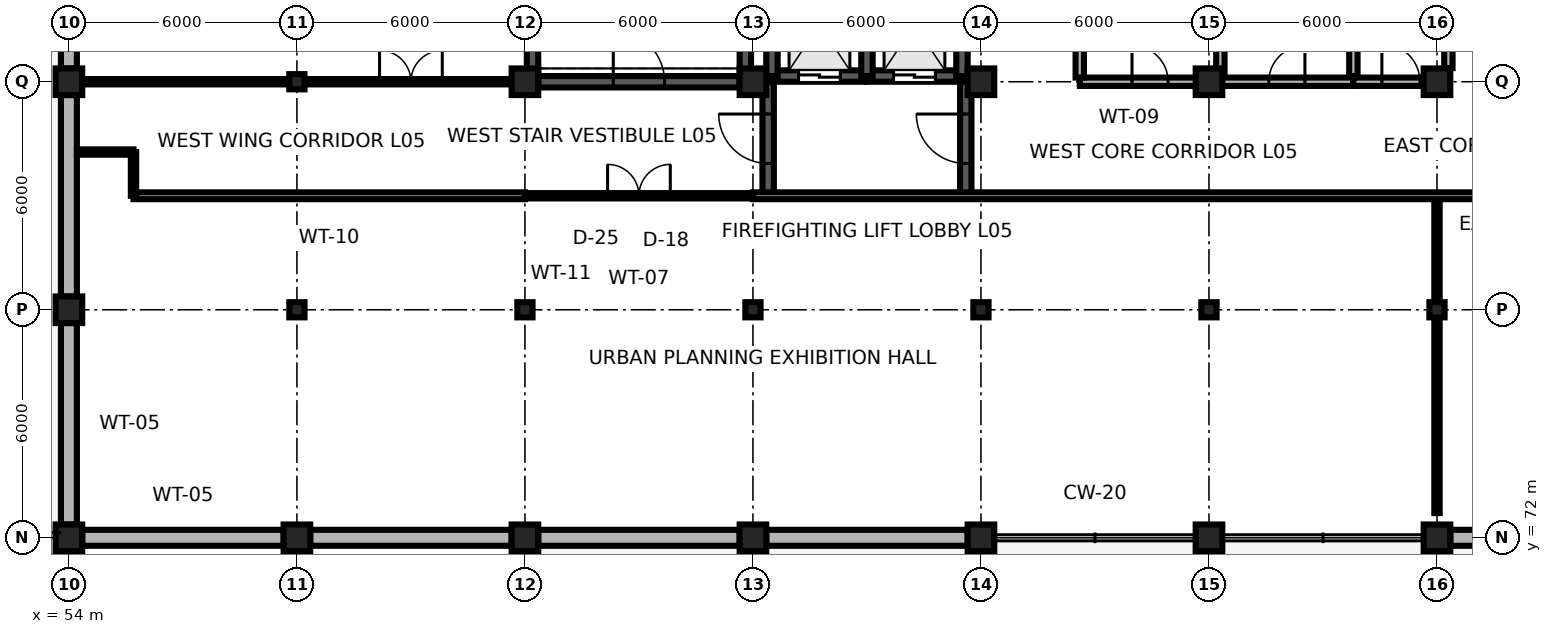
"""IFC4 building model, lengths in metres.
Left out: names, types, materials, properties, quantities, classifications, styles, units other than length and angle.
Written with IfcOpenShell. Run it as: python <this file> out.ifc"""

import sys

from ifc_helpers import new_model, si_unit, direction, frame, frame_2d, origin, origin_2d, place, context, subcontext, project, spatial, rectangle, i_section, extrude, element, fill, save


model = new_model("IFC4")
c1 = context("Model", 3, precision=1e-05, world=origin(), true_north=direction((0.0, 1.0)))
c2 = subcontext(c1, "Body", "Model", "MODEL_VIEW")
j1 = project(units=[si_unit("LENGTHUNIT", "METRE"), si_unit("PLANEANGLEUNIT", "RADIAN")], contexts=[c1])
p1 = place(None, origin())
s1 = spatial("IfcSite", under=j1, at=p1, CompositionType="ELEMENT")
p2 = place(p1, origin())
s2 = spatial("IfcBuilding", under=s1, at=p2, CompositionType="ELEMENT")
p3 = place(p2, frame((0.0, 0.0, 21.0)))
s3 = spatial("IfcBuildingStorey", under=s2, at=p3, CompositionType="ELEMENT", Elevation=21.0)
for number, where, z_axis, x_axis in (
    (1, (54.0, 72.0, 0.0), (0.0, 0.0, 1.0), (1.0, 0.0, 0.0)),
    (2, (60.0, 72.0, 0.0), (0.0, 0.0, 1.0), (1.0, 0.0, 0.0)),
    (3, (66.0, 72.0, 0.0), (0.0, 0.0, 1.0), (1.0, 0.0, 0.0)),
    (4, (72.0, 72.0, 0.0), (0.0, 0.0, 1.0), (1.0, 0.0, 0.0)),
    (5, (78.0, 72.0, 0.0), (0.0, 0.0, 1.0), (1.0, 0.0, 0.0)),
    (6, (84.0, 72.0, 0.0), (0.0, 0.0, 1.0), (1.0, 0.0, 0.0)),
    (7, (90.0, 72.0, 0.0), (0.0, 0.0, 1.0), (1.0, 0.0, 0.0)),
    (8, (54.0, 78.0, 0.0), (0.0, 0.0, 1.0), (1.0, 0.0, 0.0)),
):
    element("IfcColumn", number, at=place(p3, frame(where, z_axis=z_axis, x_axis=x_axis)), inside=s3, PredefinedType="COLUMN", context=c2, shape_type="SweptSolid", body=[
        extrude(rectangle(XDim=0.7, YDim=0.7, at=origin_2d()), origin(), (0.0, 0.0, 1.0), 3.9),
    ])
for number, where, z_axis, x_axis in (
    (9, (60.0, 78.0, 0.0), (0.0, 0.0, 1.0), (1.0, 0.0, 0.0)),
    (10, (66.0, 78.0, 0.0), (0.0, 0.0, 1.0), (1.0, 0.0, 0.0)),
    (11, (72.0, 78.0, 0.0), (0.0, 0.0, 1.0), (1.0, 0.0, 0.0)),
    (12, (78.0, 78.0, 0.0), (0.0, 0.0, 1.0), (1.0, 0.0, 0.0)),
    (13, (84.0, 78.0, 0.0), (0.0, 0.0, 1.0), (1.0, 0.0, 0.0)),
    (14, (90.0, 78.0, 0.0), (0.0, 0.0, 1.0), (1.0, 0.0, 0.0)),
):
    element("IfcColumn", number, at=place(p3, frame(where, z_axis=z_axis, x_axis=x_axis)), inside=s3, PredefinedType="COLUMN", context=c2, shape_type="SweptSolid", body=[
        extrude(i_section(OverallWidth=0.4, OverallDepth=0.4, WebThickness=0.013, FlangeThickness=0.021, FilletRadius=0.022, at=origin_2d()), origin(), (0.0, 0.0, 1.0), 3.9),
    ])
p4 = place(p3, frame((54.0, 84.0, 0.0), z_axis=(0.0, 0.0, 1.0), x_axis=(1.0, 0.0, 0.0)))
e15 = element("IfcColumn", 15, at=p4, inside=s3, PredefinedType="COLUMN", context=c2, shape_type="SweptSolid", body=[
    extrude(rectangle(XDim=0.7, YDim=0.7, at=origin_2d()), origin(), (0.0, 0.0, 1.0), 3.9),
])
p5 = place(p3, frame((60.0, 84.0, 0.0), z_axis=(0.0, 0.0, 1.0), x_axis=(1.0, 0.0, 0.0)))
e16 = element("IfcColumn", 16, at=p5, inside=s3, PredefinedType="COLUMN", context=c2, shape_type="SweptSolid", body=[
    extrude(i_section(OverallWidth=0.4, OverallDepth=0.4, WebThickness=0.013, FlangeThickness=0.021, FilletRadius=0.022, at=origin_2d()), origin(), (0.0, 0.0, 1.0), 3.9),
])
for number, where, z_axis, x_axis in (
    (17, (66.0, 84.0, 0.0), (0.0, 0.0, 1.0), (1.0, 0.0, 0.0)),
    (18, (72.0, 84.0, 0.0), (0.0, 0.0, 1.0), (1.0, 0.0, 0.0)),
    (19, (78.0, 84.0, 0.0), (0.0, 0.0, 1.0), (1.0, 0.0, 0.0)),
    (20, (84.0, 84.0, 0.0), (0.0, 0.0, 1.0), (1.0, 0.0, 0.0)),
    (21, (90.0, 84.0, 0.0), (0.0, 0.0, 1.0), (1.0, 0.0, 0.0)),
):
    element("IfcColumn", number, at=place(p3, frame(where, z_axis=z_axis, x_axis=x_axis)), inside=s3, PredefinedType="COLUMN", context=c2, shape_type="SweptSolid", body=[
        extrude(rectangle(XDim=0.7, YDim=0.7, at=origin_2d()), origin(), (0.0, 0.0, 1.0), 3.9),
    ])
for number, where, z_axis, x_axis in (
    (22, (54.35, 72.0, 0.0), (0.0, 0.0, 1.0), (1.0, 0.0, 0.0)),
    (23, (60.35, 72.0, 0.0), (0.0, 0.0, 1.0), (1.0, 0.0, 0.0)),
    (24, (66.35, 72.0, 0.0), (0.0, 0.0, 1.0), (1.0, 0.0, 0.0)),
    (25, (72.35, 72.0, 0.0), (0.0, 0.0, 1.0), (1.0, 0.0, 0.0)),
    (26, (90.35, 72.0, 0.0), (0.0, 0.0, 1.0), (1.0, 0.0, 0.0)),
    (27, (54.0, 72.35, 0.0), (0.0, 0.0, 1.0), (0.0, 1.0, 0.0)),
    (28, (54.0, 78.35, 0.0), (0.0, 0.0, 1.0), (0.0, 1.0, 0.0)),
    (29, (54.0, 84.35, 0.0), (0.0, 0.0, 1.0), (0.0, 1.0, 0.0)),
):
    element("IfcWall", number, at=place(p3, frame(where, z_axis=z_axis, x_axis=x_axis)), inside=s3, PredefinedType="SOLIDWALL", context=c2, shape_type="SweptSolid", body=[
        extrude(rectangle(XDim=5.3, YDim=0.42, at=frame_2d((2.65, 0.0))), origin(), (0.0, 0.0, 1.0), 3.28),
    ])
p6 = place(p3, frame((66.35, 84.0, 0.0), z_axis=(0.0, 0.0, 1.0), x_axis=(1.0, 0.0, 0.0)))
e30 = element("IfcWall", 30, at=p6, inside=s3, PredefinedType="SHEAR", context=c2, shape_type="SweptSolid", body=[
    extrude(rectangle(XDim=5.3, YDim=0.3, at=frame_2d((2.65, 0.0))), origin(), (0.0, 0.0, 1.0), 3.66),
])
p7 = place(p6, frame((1.975, 0.0, 0.0)))
e31 = element("IfcOpeningElement", 31, at=p7, cuts=e30, PredefinedType="OPENING", context=c2, shape_type="SweptSolid", body=[
    extrude(rectangle(XDim=1.35, YDim=2.2, at=frame_2d((0.675, 1.1))), frame((0.0, 0.165, 0.0), z_axis=(0.0, -1.0, 0.0), x_axis=(1.0, 0.0, 0.0)), (0.0, 0.0, 1.0), 0.33),
])
for number, where, z_axis, x_axis in (
    (32, (66.2, 84.0, 0.0), (0.0, 0.0, 1.0), (0.0, 1.0, 0.0)),
    (33, (71.8, 84.0, 0.0), (0.0, 0.0, 1.0), (0.0, 1.0, 0.0)),
):
    element("IfcWall", number, at=place(p3, frame(where, z_axis=z_axis, x_axis=x_axis)), inside=s3, PredefinedType="SHEAR", context=c2, shape_type="SweptSolid", body=[
        extrude(rectangle(XDim=11.8, YDim=0.3, at=frame_2d((5.9, 0.0))), origin(), (0.0, 0.0, 1.0), 3.74),
    ])
p8 = place(p3, frame((72.5, 84.15, 0.0), z_axis=(0.0, 0.0, 1.0), x_axis=(1.0, 0.0, 0.0)))
e34 = element("IfcWall", 34, at=p8, inside=s3, PredefinedType="SHEAR", context=c2, shape_type="SweptSolid", body=[
    extrude(rectangle(XDim=2.5, YDim=0.3, at=frame_2d((1.25, 0.0))), origin(), (0.0, 0.0, 1.0), 3.74),
])
p9 = place(p8, frame((0.7, 0.0, 0.0)))
e35 = element("IfcOpeningElement", 35, at=p9, cuts=e34, PredefinedType="OPENING", context=c2, shape_type="SweptSolid", body=[
    extrude(rectangle(XDim=1.1, YDim=2.1, at=frame_2d((0.55, 1.05))), frame((0.0, 0.165, 0.0), z_axis=(0.0, -1.0, 0.0), x_axis=(1.0, 0.0, 0.0)), (0.0, 0.0, 1.0), 0.33),
])
p10 = place(p3, frame((72.5, 84.15, 0.0), z_axis=(0.0, 0.0, 1.0), x_axis=(0.0, 1.0, 0.0)))
e36 = element("IfcWall", 36, at=p10, inside=s3, PredefinedType="SHEAR", context=c2, shape_type="SweptSolid", body=[
    extrude(rectangle(XDim=3.4, YDim=0.3, at=frame_2d((1.7, 0.0))), origin(), (0.0, 0.0, 1.0), 3.74),
])
p11 = place(p3, frame((75.0, 84.15, 0.0), z_axis=(0.0, 0.0, 1.0), x_axis=(1.0, 0.0, 0.0)))
e37 = element("IfcWall", 37, at=p11, inside=s3, PredefinedType="SHEAR", context=c2, shape_type="SweptSolid", body=[
    extrude(rectangle(XDim=2.5, YDim=0.3, at=frame_2d((1.25, 0.0))), origin(), (0.0, 0.0, 1.0), 3.74),
])
p12 = place(p11, frame((0.7, 0.0, 0.0)))
e38 = element("IfcOpeningElement", 38, at=p12, cuts=e37, PredefinedType="OPENING", context=c2, shape_type="SweptSolid", body=[
    extrude(rectangle(XDim=1.1, YDim=2.1, at=frame_2d((0.55, 1.05))), frame((0.0, 0.165, 0.0), z_axis=(0.0, -1.0, 0.0), x_axis=(1.0, 0.0, 0.0)), (0.0, 0.0, 1.0), 0.33),
])
for number, where, z_axis, x_axis in (
    (39, (75.0, 84.15, 0.0), (0.0, 0.0, 1.0), (0.0, 1.0, 0.0)),
    (40, (77.5, 84.15, 0.0), (0.0, 0.0, 1.0), (0.0, 1.0, 0.0)),
):
    element("IfcWall", number, at=place(p3, frame(where, z_axis=z_axis, x_axis=x_axis)), inside=s3, PredefinedType="SHEAR", context=c2, shape_type="SweptSolid", body=[
        extrude(rectangle(XDim=3.4, YDim=0.3, at=frame_2d((1.7, 0.0))), origin(), (0.0, 0.0, 1.0), 3.74),
    ])
p13 = place(p3, frame((72.4, 81.0, 0.0), z_axis=(0.0, 0.0, 1.0), x_axis=(0.0, 1.0, 0.0)))
e41 = element("IfcWall", 41, at=p13, inside=s3, PredefinedType="SHEAR", context=c2, shape_type="SweptSolid", body=[
    extrude(rectangle(XDim=3.0, YDim=0.3, at=frame_2d((1.5, 0.0))), origin(), (0.0, 0.0, 1.0), 3.7),
])
p14 = place(p13, frame((0.85, 0.0, 0.0)))
e42 = element("IfcOpeningElement", 42, at=p14, cuts=e41, PredefinedType="OPENING", context=c2, shape_type="SweptSolid", body=[
    extrude(rectangle(XDim=1.3, YDim=2.2, at=frame_2d((0.65, 1.1))), frame((0.0, 0.165, 0.0), z_axis=(0.0, -1.0, 0.0), x_axis=(1.0, 0.0, 0.0)), (0.0, 0.0, 1.0), 0.33),
])
p15 = place(p3, frame((77.6, 81.0, 0.0), z_axis=(0.0, 0.0, 1.0), x_axis=(0.0, 1.0, 0.0)))
e43 = element("IfcWall", 43, at=p15, inside=s3, PredefinedType="SHEAR", context=c2, shape_type="SweptSolid", body=[
    extrude(rectangle(XDim=3.0, YDim=0.3, at=frame_2d((1.5, 0.0))), origin(), (0.0, 0.0, 1.0), 3.7),
])
p16 = place(p15, frame((0.85, 0.0, 0.0)))
e44 = element("IfcOpeningElement", 44, at=p16, cuts=e43, PredefinedType="OPENING", context=c2, shape_type="SweptSolid", body=[
    extrude(rectangle(XDim=1.3, YDim=2.2, at=frame_2d((0.65, 1.1))), frame((0.0, 0.165, 0.0), z_axis=(0.0, -1.0, 0.0), x_axis=(1.0, 0.0, 0.0)), (0.0, 0.0, 1.0), 0.33),
])
p17 = place(p3, frame((80.6, 84.0, 0.0), z_axis=(0.0, 0.0, 1.0), x_axis=(1.0, 0.0, 0.0)))
e45 = element("IfcWall", 45, at=p17, inside=s3, PredefinedType="PARTITIONING", context=c2, shape_type="SweptSolid", body=[
    extrude(rectangle(XDim=3.7, YDim=0.22, at=frame_2d((1.85, 0.0))), origin(), (0.0, 0.0, 1.0), 3.312),
])
p18 = place(p17, frame((1.375, 0.0, 0.0)))
e46 = element("IfcOpeningElement", 46, at=p18, cuts=e45, PredefinedType="OPENING", context=c2, shape_type="SweptSolid", body=[
    extrude(rectangle(XDim=0.95, YDim=2.15, at=frame_2d((0.475, 1.075))), frame((0.0, 0.125, 0.0), z_axis=(0.0, -1.0, 0.0), x_axis=(1.0, 0.0, 0.0)), (0.0, 0.0, 1.0), 0.25),
])
p19 = place(p3, frame((84.3, 84.0, 0.0), z_axis=(0.0, 0.0, 1.0), x_axis=(1.0, 0.0, 0.0)))
e47 = element("IfcWall", 47, at=p19, inside=s3, PredefinedType="PARTITIONING", context=c2, shape_type="SweptSolid", body=[
    extrude(rectangle(XDim=3.5, YDim=0.22, at=frame_2d((1.75, 0.0))), origin(), (0.0, 0.0, 1.0), 3.312),
])
p20 = place(p19, frame((1.275, 0.0, 0.0)))
e48 = element("IfcOpeningElement", 48, at=p20, cuts=e47, PredefinedType="OPENING", context=c2, shape_type="SweptSolid", body=[
    extrude(rectangle(XDim=0.95, YDim=2.1, at=frame_2d((0.475, 1.05))), frame((0.0, 0.125, 0.0), z_axis=(0.0, -1.0, 0.0), x_axis=(1.0, 0.0, 0.0)), (0.0, 0.0, 1.0), 0.25),
])
p21 = place(p3, frame((87.8, 84.0, 0.0), z_axis=(0.0, 0.0, 1.0), x_axis=(1.0, 0.0, 0.0)))
e49 = element("IfcWall", 49, at=p21, inside=s3, PredefinedType="PARTITIONING", context=c2, shape_type="SweptSolid", body=[
    extrude(rectangle(XDim=2.5, YDim=0.22, at=frame_2d((1.25, 0.0))), origin(), (0.0, 0.0, 1.0), 3.312),
])
p22 = place(p21, frame((0.75, 0.0, 0.0)))
e50 = element("IfcOpeningElement", 50, at=p22, cuts=e49, PredefinedType="OPENING", context=c2, shape_type="SweptSolid", body=[
    extrude(rectangle(XDim=1.0, YDim=2.15, at=frame_2d((0.5, 1.075))), frame((0.0, 0.125, 0.0), z_axis=(0.0, -1.0, 0.0), x_axis=(1.0, 0.0, 0.0)), (0.0, 0.0, 1.0), 0.25),
])
for number, where, z_axis, x_axis in (
    (51, (84.3, 84.15, 0.0), (0.0, 0.0, 1.0), (0.0, 1.0, 0.0)),
    (52, (87.8, 84.15, 0.0), (0.0, 0.0, 1.0), (0.0, 1.0, 0.0)),
):
    element("IfcWall", number, at=place(p3, frame(where, z_axis=z_axis, x_axis=x_axis)), inside=s3, PredefinedType="PARTITIONING", context=c2, shape_type="SweptSolid", body=[
        extrude(rectangle(XDim=5.0, YDim=0.22, at=frame_2d((2.5, 0.0))), origin(), (0.0, 0.0, 1.0), 3.7),
    ])
p23 = place(p3, frame((66.0, 81.0, 0.0), z_axis=(0.0, 0.0, 1.0), x_axis=(1.0, 0.0, 0.0)))
e53 = element("IfcWall", 53, at=p23, inside=s3, PredefinedType="PARTITIONING", context=c2, shape_type="SweptSolid", body=[
    extrude(rectangle(XDim=6.0, YDim=0.14, at=frame_2d((3.0, 0.0))), origin(), (0.0, 0.0, 1.0), 3.7),
])
p24 = place(p23, frame((2.175, 0.0, 0.0)))
e54 = element("IfcOpeningElement", 54, at=p24, cuts=e53, PredefinedType="OPENING", context=c2, shape_type="SweptSolid", body=[
    extrude(rectangle(XDim=1.65, YDim=2.35, at=frame_2d((0.825, 1.175))), frame((0.0, 0.085, 0.0), z_axis=(0.0, -1.0, 0.0), x_axis=(1.0, 0.0, 0.0)), (0.0, 0.0, 1.0), 0.17),
])
p25 = place(p3, frame((60.0, 84.0, 0.0), z_axis=(0.0, 0.0, 1.0), x_axis=(1.0, 0.0, 0.0)))
e55 = element("IfcWall", 55, at=p25, inside=s3, PredefinedType="PARTITIONING", context=c2, shape_type="SweptSolid", body=[
    extrude(rectangle(XDim=6.0, YDim=0.14, at=frame_2d((3.0, 0.0))), origin(), (0.0, 0.0, 1.0), 3.312),
])
p26 = place(p25, frame((2.175, 0.0, 0.0)))
e56 = element("IfcOpeningElement", 56, at=p26, cuts=e55, PredefinedType="OPENING", context=c2, shape_type="SweptSolid", body=[
    extrude(rectangle(XDim=1.65, YDim=2.35, at=frame_2d((0.825, 1.175))), frame((0.0, 0.085, 0.0), z_axis=(0.0, -1.0, 0.0), x_axis=(1.0, 0.0, 0.0)), (0.0, 0.0, 1.0), 0.17),
])
p27 = place(p3, frame((90.0, 72.65, 0.0), z_axis=(0.0, 0.0, 1.0), x_axis=(0.0, 1.0, 0.0)))
e57 = element("IfcWall", 57, at=p27, inside=s3, PredefinedType="PARTITIONING", context=c2, shape_type="SweptSolid", body=[
    extrude(rectangle(XDim=8.35, YDim=0.14, at=frame_2d((4.175, 0.0))), origin(), (0.0, 0.0, 1.0), 3.312),
])
p28 = place(p3, frame((80.6, 84.11, 0.0), z_axis=(0.0, 0.0, 1.0), x_axis=(0.0, 1.0, 0.0)))
e58 = element("IfcWall", 58, at=p28, inside=s3, PredefinedType="PARTITIONING", context=c2, shape_type="SweptSolid", body=[
    extrude(rectangle(XDim=4.98, YDim=0.22, at=frame_2d((2.49, 0.0))), origin(), (0.0, 0.0, 1.0), 3.7),
])
p29 = place(p3, frame((90.3, 84.36, 0.0), z_axis=(0.0, 0.0, 1.0), x_axis=(0.0, 1.0, 0.0)))
e59 = element("IfcWall", 59, at=p29, inside=s3, PredefinedType="PARTITIONING", context=c2, shape_type="SweptSolid", body=[
    extrude(rectangle(XDim=4.73, YDim=0.22, at=frame_2d((2.365, 0.0))), origin(), (0.0, 0.0, 1.0), 3.7),
])
p30 = place(p3, frame((55.7, 81.0, 0.0), z_axis=(0.0, 0.0, 1.0), x_axis=(1.0, 0.0, 0.0)))
e60 = element("IfcWall", 60, at=p30, inside=s3, PredefinedType="PARTITIONING", context=c2, shape_type="SweptSolid", body=[
    extrude(rectangle(XDim=10.3, YDim=0.18, at=frame_2d((5.15, 0.0))), origin(), (0.0, 0.0, 1.0), 3.7),
])
p31 = place(p3, frame((72.0, 81.0, 0.0), z_axis=(0.0, 0.0, 1.0), x_axis=(1.0, 0.0, 0.0)))
e61 = element("IfcWall", 61, at=p31, inside=s3, PredefinedType="PARTITIONING", context=c2, shape_type="SweptSolid", body=[
    extrude(rectangle(XDim=24.0, YDim=0.18, at=frame_2d((12.0, 0.0))), origin(), (0.0, 0.0, 1.0), 3.7),
])
p32 = place(p3, frame((55.7, 81.0, 0.0), z_axis=(0.0, 0.0, 1.0), x_axis=(0.0, 1.0, 0.0)))
e62 = element("IfcWall", 62, at=p32, inside=s3, PredefinedType="PARTITIONING", context=c2, shape_type="SweptSolid", body=[
    extrude(rectangle(XDim=1.15, YDim=0.14, at=frame_2d((0.575, 0.0))), origin(), (0.0, 0.0, 1.0), 3.7),
])
p33 = place(p3, frame((55.7, 82.15, 0.0), z_axis=(0.0, 0.0, 1.0), x_axis=(-1.0, 0.0, 0.0)))
e63 = element("IfcWall", 63, at=p33, inside=s3, PredefinedType="PARTITIONING", context=c2, shape_type="SweptSolid", body=[
    extrude(rectangle(XDim=1.49, YDim=0.14, at=frame_2d((0.745, 0.0))), origin(), (0.0, 0.0, 1.0), 3.7),
])
p34 = place(p3, frame((54.35, 84.0, 0.0), z_axis=(0.0, 0.0, 1.0), x_axis=(1.0, 0.0, 0.0)))
e64 = element("IfcWall", 64, at=p34, inside=s3, PredefinedType="PARTITIONING", context=c2, shape_type="SweptSolid", body=[
    extrude(rectangle(XDim=5.65, YDim=0.14, at=frame_2d((2.825, 0.0))), origin(), (0.0, 0.0, 1.0), 3.312),
])
p35 = place(p7, origin())
e65 = element("IfcDoor", 65, at=p35, inside=s3, OperationType="SINGLE_SWING_LEFT", PredefinedType="DOOR", context=c2, shape_type="SweptSolid", body=[
    extrude(rectangle(XDim=1.35, YDim=2.2, at=frame_2d((0.675, 1.1))), frame((0.0, 0.025, 0.0), z_axis=(0.0, -1.0, 0.0), x_axis=(1.0, 0.0, 0.0)), (0.0, 0.0, 1.0), 0.05),
])
fill(e31, e65)
p36 = place(p9, origin())
e66 = element("IfcDoor", 66, at=p36, inside=s3, OperationType="DOUBLE_DOOR_SLIDING", PredefinedType="DOOR", context=c2, shape_type="SweptSolid", body=[
    extrude(rectangle(XDim=1.1, YDim=2.1, at=frame_2d((0.55, 1.05))), frame((0.0, 0.025, 0.0), z_axis=(0.0, -1.0, 0.0), x_axis=(1.0, 0.0, 0.0)), (0.0, 0.0, 1.0), 0.05),
])
fill(e35, e66)
p37 = place(p12, origin())
e67 = element("IfcDoor", 67, at=p37, inside=s3, OperationType="DOUBLE_DOOR_SLIDING", PredefinedType="DOOR", context=c2, shape_type="SweptSolid", body=[
    extrude(rectangle(XDim=1.1, YDim=2.1, at=frame_2d((0.55, 1.05))), frame((0.0, 0.025, 0.0), z_axis=(0.0, -1.0, 0.0), x_axis=(1.0, 0.0, 0.0)), (0.0, 0.0, 1.0), 0.05),
])
fill(e38, e67)
p38 = place(p14, origin())
e68 = element("IfcDoor", 68, at=p38, inside=s3, OperationType="SINGLE_SWING_RIGHT", PredefinedType="DOOR", context=c2, shape_type="SweptSolid", body=[
    extrude(rectangle(XDim=1.3, YDim=2.2, at=frame_2d((0.65, 1.1))), frame((0.0, 0.025, 0.0), z_axis=(0.0, -1.0, 0.0), x_axis=(1.0, 0.0, 0.0)), (0.0, 0.0, 1.0), 0.05),
])
fill(e42, e68)
p39 = place(p16, origin())
e69 = element("IfcDoor", 69, at=p39, inside=s3, OperationType="SINGLE_SWING_RIGHT", PredefinedType="DOOR", context=c2, shape_type="SweptSolid", body=[
    extrude(rectangle(XDim=1.3, YDim=2.2, at=frame_2d((0.65, 1.1))), frame((0.0, 0.025, 0.0), z_axis=(0.0, -1.0, 0.0), x_axis=(1.0, 0.0, 0.0)), (0.0, 0.0, 1.0), 0.05),
])
fill(e44, e69)
p40 = place(p18, origin())
e70 = element("IfcDoor", 70, at=p40, inside=s3, OperationType="SINGLE_SWING_LEFT", PredefinedType="DOOR", context=c2, shape_type="SweptSolid", body=[
    extrude(rectangle(XDim=0.95, YDim=2.15, at=frame_2d((0.475, 1.075))), frame((0.0, 0.025, 0.0), z_axis=(0.0, -1.0, 0.0), x_axis=(1.0, 0.0, 0.0)), (0.0, 0.0, 1.0), 0.05),
])
fill(e46, e70)
p41 = place(p20, origin())
e71 = element("IfcDoor", 71, at=p41, inside=s3, OperationType="SINGLE_SWING_RIGHT", PredefinedType="DOOR", context=c2, shape_type="SweptSolid", body=[
    extrude(rectangle(XDim=0.95, YDim=2.1, at=frame_2d((0.475, 1.05))), frame((0.0, 0.025, 0.0), z_axis=(0.0, -1.0, 0.0), x_axis=(1.0, 0.0, 0.0)), (0.0, 0.0, 1.0), 0.05),
])
fill(e48, e71)
p42 = place(p22, origin())
e72 = element("IfcDoor", 72, at=p42, inside=s3, OperationType="SINGLE_SWING_LEFT", PredefinedType="DOOR", context=c2, shape_type="SweptSolid", body=[
    extrude(rectangle(XDim=1.0, YDim=2.15, at=frame_2d((0.5, 1.075))), frame((0.0, 0.025, 0.0), z_axis=(0.0, -1.0, 0.0), x_axis=(1.0, 0.0, 0.0)), (0.0, 0.0, 1.0), 0.05),
])
fill(e50, e72)
p43 = place(p24, origin())
e73 = element("IfcDoor", 73, at=p43, inside=s3, OperationType="DOUBLE_DOOR_SINGLE_SWING", PredefinedType="DOOR", context=c2, shape_type="SweptSolid", body=[
    extrude(rectangle(XDim=1.65, YDim=2.35, at=frame_2d((0.825, 1.175))), frame((0.0, 0.025, 0.0), z_axis=(0.0, -1.0, 0.0), x_axis=(1.0, 0.0, 0.0)), (0.0, 0.0, 1.0), 0.05),
])
fill(e54, e73)
p44 = place(p26, origin())
e74 = element("IfcDoor", 74, at=p44, inside=s3, OperationType="DOUBLE_DOOR_SINGLE_SWING", PredefinedType="DOOR", context=c2, shape_type="SweptSolid", body=[
    extrude(rectangle(XDim=1.65, YDim=2.35, at=frame_2d((0.825, 1.175))), frame((0.0, 0.025, 0.0), z_axis=(0.0, -1.0, 0.0), x_axis=(1.0, 0.0, 0.0)), (0.0, 0.0, 1.0), 0.05),
])
fill(e56, e74)
save(model, sys.argv[1])
